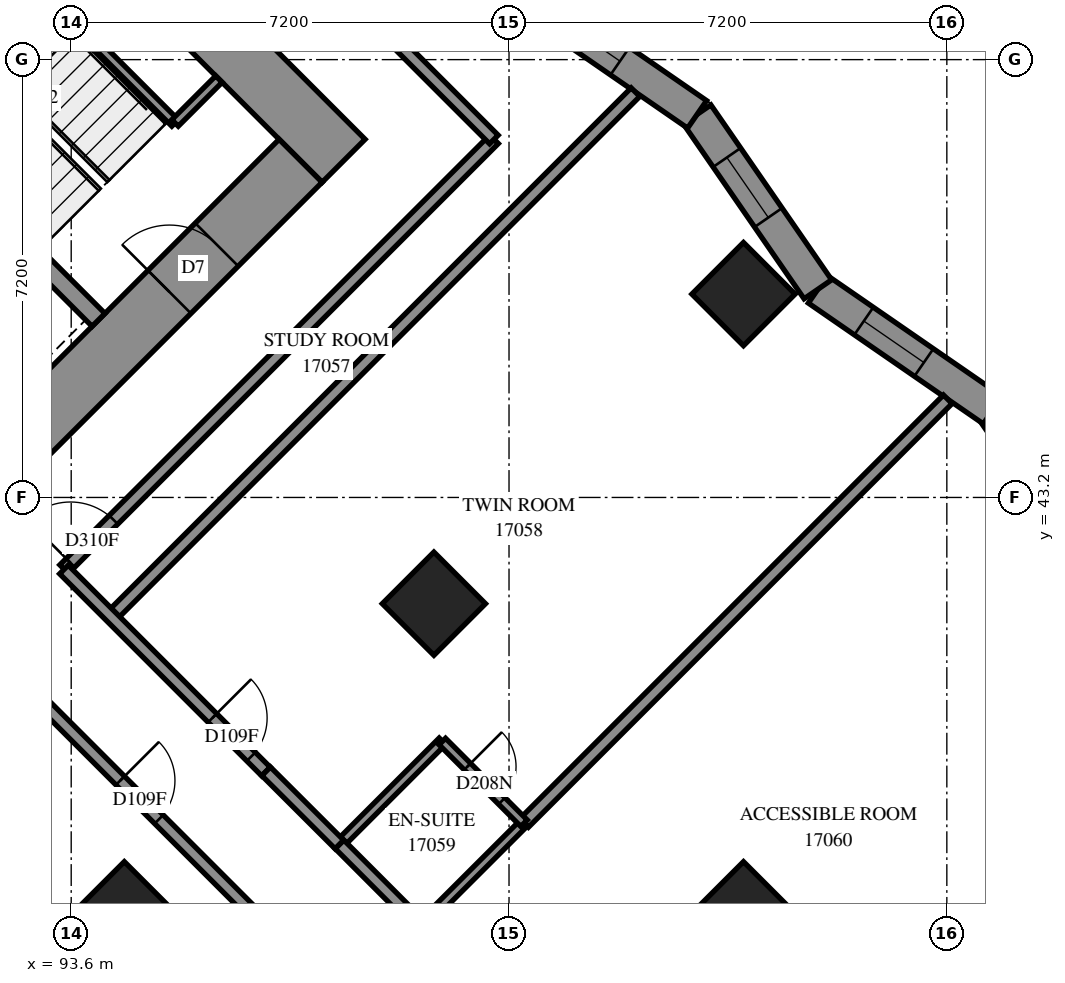
"""IFC4 building model, lengths in metres.
Left out: names, types, materials, properties, quantities, classifications, styles, units other than length and angle.
Written with IfcOpenShell. Run it as: python <this file> out.ifc"""

import sys

from ifc_helpers import new_model, si_unit, direction, frame, frame_2d, origin, origin_2d, place, context, subcontext, project, spatial, polyline, rectangle, outline, extrude, element, fill, save


model = new_model("IFC4")
c1 = context("Model", 3, precision=1e-05, world=origin(), true_north=direction((0.0, 1.0)))
c2 = subcontext(c1, "Body", "Model", "MODEL_VIEW")
j1 = project(units=[si_unit("LENGTHUNIT", "METRE"), si_unit("PLANEANGLEUNIT", "RADIAN")], contexts=[c1])
p1 = place(None, origin())
s1 = spatial("IfcSite", under=j1, at=p1, CompositionType="ELEMENT")
p2 = place(p1, origin())
s2 = spatial("IfcBuilding", under=s1, at=p2, CompositionType="ELEMENT")
p3 = place(p2, frame((0.0, 0.0, 64.4)))
s3 = spatial("IfcBuildingStorey", under=s2, at=p3, CompositionType="ELEMENT", Elevation=64.4)
for number, where, z_axis, x_axis in (
    (1, (104.656, 46.544, 0.0), (0.0, 0.0, 1.0), (0.707, -0.707, 0.0)),
    (2, (99.565, 41.453, 0.0), (0.0, 0.0, 1.0), (0.707, -0.707, 0.0)),
    (3, (94.474, 36.362, 0.0), (0.0, 0.0, 1.0), (0.707, -0.707, 0.0)),
    (4, (104.656, 36.362, 0.0), (0.0, 0.0, 1.0), (0.707, -0.707, 0.0)),
):
    element("IfcColumn", number, at=place(p3, frame(where, z_axis=z_axis, x_axis=x_axis)), inside=s3, PredefinedType="COLUMN", context=c2, shape_type="SweptSolid", body=[
        extrude(rectangle(XDim=1.2, YDim=1.2, at=origin_2d()), origin(), (0.0, 0.0, 1.0), 3.1),
    ])
p4 = place(p3, frame((86.483, 60.333, -0.3), z_axis=(0.0, 0.0, 1.0), x_axis=(0.70710983, -0.7071037324, 0.0)))
e5 = element("IfcWall", 5, at=p4, inside=s3, PredefinedType="SHEAR", context=c2, shape_type="SweptSolid", body=[
    extrude(rectangle(XDim=16.4, YDim=1.0, at=frame_2d((8.2, 0.0))), origin(), (0.0, 0.0, 1.0), 2.7),
])
p5 = place(p4, frame((11.0, 0.0, 0.3)))
e6 = element("IfcOpeningElement", 6, at=p5, cuts=e5, PredefinedType="OPENING", context=c2, shape_type="SweptSolid", body=[
    extrude(rectangle(XDim=0.8, YDim=2.1, at=frame_2d((0.4, 1.05))), frame((0.0, 0.51, 0.0), z_axis=(0.0, -1.0, 0.0), x_axis=(1.0, 0.0, 0.0)), (0.0, 0.0, 1.0), 1.02),
])
p6 = place(p3, frame((87.19, 38.554, -0.3), z_axis=(0.0, 0.0, 1.0), x_axis=(0.707103309, 0.7071102534, 0.0)))
e7 = element("IfcWall", 7, at=p6, inside=s3, PredefinedType="SHEAR", context=c2, shape_type="SweptSolid", body=[
    extrude(rectangle(XDim=14.4, YDim=1.0, at=frame_2d((7.2, 0.0))), origin(), (0.0, 0.0, 1.0), 2.7),
])
p7 = place(p6, frame((4.55, 0.0, 0.3)))
e8 = element("IfcOpeningElement", 8, at=p7, cuts=e7, PredefinedType="OPENING", context=c2, shape_type="SweptSolid", body=[
    extrude(rectangle(XDim=1.1, YDim=2.1, at=frame_2d((0.55, 1.05))), frame((0.0, 0.51, 0.0), z_axis=(0.0, -1.0, 0.0), x_axis=(1.0, 0.0, 0.0)), (0.0, 0.0, 1.0), 1.02),
])
p8 = place(p6, frame((11.35, 0.0, 0.3)))
e9 = element("IfcOpeningElement", 9, at=p8, cuts=e7, PredefinedType="OPENING", context=c2, shape_type="SweptSolid", body=[
    extrude(rectangle(XDim=1.1, YDim=2.1, at=frame_2d((0.55, 1.05))), frame((0.0, 0.51, 0.0), z_axis=(0.0, -1.0, 0.0), x_axis=(1.0, 0.0, 0.0)), (0.0, 0.0, 1.0), 1.02),
])
p9 = place(p3, frame((88.958, 51.211, 0.0), z_axis=(0.0, 0.0, 1.0), x_axis=(0.7070998367, -0.7071137256, 0.0)))
e10 = element("IfcWall", 10, at=p9, inside=s3, PredefinedType="SOLIDWALL", context=c2, shape_type="SweptSolid", body=[
    extrude(rectangle(XDim=7.2, YDim=0.3, at=frame_2d((3.6, 0.0))), origin(), (0.0, 0.0, 1.0), 3.1),
])
p10 = place(p3, frame((110.741, 41.761, 0.0), z_axis=(0.0, 0.0, 1.0), x_axis=(-0.5680698592, 0.822980337, 0.0)))
e11 = element("IfcWall", 11, at=p10, inside=s3, PredefinedType="SOLIDWALL", context=c2, shape_type="SweptSolid", body=[
    extrude(outline(polyline([(0.05, -0.275), (3.546, -0.275), (3.445, 0.275), (-0.05, 0.275), (0.05, -0.275)])), origin(), (0.0, 0.0, 1.0), 3.1),
])
p11 = place(p10, frame((1.269, 0.0, 0.5)))
e12 = element("IfcOpeningElement", 12, at=p11, cuts=e11, PredefinedType="OPENING", context=c2, shape_type="SweptSolid", body=[
    extrude(rectangle(XDim=1.2, YDim=2.45, at=frame_2d((0.6, 1.225))), frame((0.0, 0.285, 0.0), z_axis=(0.0, -1.0, 0.0), x_axis=(1.0, 0.0, 0.0)), (0.0, 0.0, 1.0), 0.57),
])
p12 = place(p3, frame((108.755, 44.637, 0.0), z_axis=(0.0, 0.0, 1.0), x_axis=(-0.8229761943, 0.5680758609, 0.0)))
e13 = element("IfcWall", 13, at=p12, inside=s3, PredefinedType="SOLIDWALL", context=c2, shape_type="SweptSolid", body=[
    extrude(outline(polyline([(-0.05, -0.275), (3.445, -0.275), (3.546, 0.275), (0.05, 0.275), (-0.05, -0.275)])), origin(), (0.0, 0.0, 1.0), 3.1),
])
p13 = place(p12, frame((1.377, 0.0, 0.5)))
e14 = element("IfcOpeningElement", 14, at=p13, cuts=e13, PredefinedType="OPENING", context=c2, shape_type="SweptSolid", body=[
    extrude(rectangle(XDim=1.2, YDim=2.45, at=frame_2d((0.6, 1.225))), frame((0.0, 0.285, 0.0), z_axis=(0.0, -1.0, 0.0), x_axis=(1.0, 0.0, 0.0)), (0.0, 0.0, 1.0), 0.57),
])
p14 = place(p3, frame((105.879, 46.623, 0.0), z_axis=(0.0, 0.0, 1.0), x_axis=(-0.5680698592, 0.822980337, 0.0)))
e15 = element("IfcWall", 15, at=p14, inside=s3, PredefinedType="SOLIDWALL", context=c2, shape_type="SweptSolid", body=[
    extrude(outline(polyline([(0.05, -0.275), (3.546, -0.275), (3.445, 0.275), (-0.05, 0.275), (0.05, -0.275)])), origin(), (0.0, 0.0, 1.0), 3.1),
])
p15 = place(p14, frame((1.434, 0.0, 0.5)))
e16 = element("IfcOpeningElement", 16, at=p15, cuts=e15, PredefinedType="OPENING", context=c2, shape_type="SweptSolid", body=[
    extrude(rectangle(XDim=1.2, YDim=2.45, at=frame_2d((0.6, 1.225))), frame((0.0, 0.285, 0.0), z_axis=(0.0, -1.0, 0.0), x_axis=(1.0, 0.0, 0.0)), (0.0, 0.0, 1.0), 0.57),
])
p16 = place(p3, frame((103.893, 49.499, 0.0), z_axis=(0.0, 0.0, 1.0), x_axis=(-0.8229761943, 0.5680758609, 0.0)))
e17 = element("IfcWall", 17, at=p16, inside=s3, PredefinedType="SOLIDWALL", context=c2, shape_type="SweptSolid", body=[
    extrude(outline(polyline([(-0.05, -0.275), (3.445, -0.275), (3.546, 0.275), (0.05, 0.275), (-0.05, -0.275)])), origin(), (0.0, 0.0, 1.0), 3.1),
])
p17 = place(p16, frame((1.541, 0.0, 0.5)))
e18 = element("IfcOpeningElement", 18, at=p17, cuts=e17, PredefinedType="OPENING", context=c2, shape_type="SweptSolid", body=[
    extrude(rectangle(XDim=1.2, YDim=2.45, at=frame_2d((0.6, 1.225))), frame((0.0, 0.285, 0.0), z_axis=(0.0, -1.0, 0.0), x_axis=(1.0, 0.0, 0.0)), (0.0, 0.0, 1.0), 0.57),
])
p18 = place(p3, frame((91.313, 53.354, 0.0), z_axis=(0.0, 0.0, 1.0), x_axis=(0.7071067812, -0.7071067812, 0.0)))
e19 = element("IfcWall", 19, at=p18, inside=s3, PredefinedType="PARTITIONING", context=c2, shape_type="SweptSolid", body=[
    extrude(rectangle(XDim=5.65, YDim=0.15, at=frame_2d((2.825, 0.0))), origin(), (0.0, 0.0, 1.0), 3.1),
])
p19 = place(p3, frame((95.308, 49.358, 0.0), z_axis=(0.0, 0.0, 1.0), x_axis=(0.70705776, 0.707155799, 0.0)))
e20 = element("IfcWall", 20, at=p19, inside=s3, PredefinedType="PARTITIONING", context=c2, shape_type="SweptSolid", body=[
    extrude(rectangle(XDim=1.02, YDim=0.15, at=frame_2d((0.51, 0.0))), origin(), (0.0, 0.0, 1.0), 3.1),
])
p20 = place(p3, frame((94.259, 41.243, 0.0), z_axis=(0.0, 0.0, 1.0), x_axis=(0.7070206559, 0.7071928959, 0.0)))
e21 = element("IfcWall", 21, at=p20, inside=s3, PredefinedType="PARTITIONING", context=c2, shape_type="SweptSolid", body=[
    extrude(rectangle(XDim=12.192, YDim=0.2, at=frame_2d((6.096, 0.0))), origin(), (0.0, 0.0, 1.0), 3.1),
])
p21 = place(p3, frame((93.484, 42.02, 0.0), z_axis=(0.0, 0.0, 1.0), x_axis=(0.7071067812, 0.7071067812, 0.0)))
e22 = element("IfcWall", 22, at=p21, inside=s3, PredefinedType="PARTITIONING", context=c2, shape_type="SweptSolid", body=[
    extrude(rectangle(XDim=9.998, YDim=0.2, at=frame_2d((4.999, 0.0))), origin(), (0.0, 0.0, 1.0), 3.1),
])
p22 = place(p21, frame((0.148, 0.0, 0.0)))
e23 = element("IfcOpeningElement", 23, at=p22, cuts=e22, PredefinedType="OPENING", context=c2, shape_type="SweptSolid", body=[
    extrude(rectangle(XDim=1.0, YDim=2.1, at=frame_2d((0.5, 1.05))), frame((0.0, 0.11, 0.0), z_axis=(0.0, -1.0, 0.0), x_axis=(1.0, 0.0, 0.0)), (0.0, 0.0, 1.0), 0.22),
])
p23 = place(p3, frame((106.14, 32.756, 0.0), z_axis=(0.0, 0.0, 1.0), x_axis=(0.7071017366, 0.7071118258, 0.0)))
e24 = element("IfcWall", 24, at=p23, inside=s3, PredefinedType="PARTITIONING", context=c2, shape_type="SweptSolid", body=[
    extrude(rectangle(XDim=9.912, YDim=0.2, at=frame_2d((4.956, 0.0))), origin(), (0.0, 0.0, 1.0), 3.1),
])
p24 = place(p3, frame((101.049, 37.847, 0.0), z_axis=(0.0, 0.0, 1.0), x_axis=(0.7071067812, 0.7071067812, 0.0)))
e25 = element("IfcWall", 25, at=p24, inside=s3, PredefinedType="PARTITIONING", context=c2, shape_type="SweptSolid", body=[
    extrude(rectangle(XDim=9.852, YDim=0.2, at=frame_2d((4.926, 0.0))), origin(), (0.0, 0.0, 1.0), 3.1),
])
p25 = place(p3, frame((92.349, 40.601, 0.0), z_axis=(0.0, 0.0, 1.0), x_axis=(0.7071067812, -0.7071067812, 0.0)))
e26 = element("IfcWall", 26, at=p25, inside=s3, PredefinedType="PARTITIONING", context=c2, shape_type="SweptSolid", body=[
    extrude(rectangle(XDim=8.101, YDim=0.2, at=frame_2d((4.05, 0.0))), origin(), (0.0, 0.0, 1.0), 3.1),
])
p26 = place(p25, frame((2.909, 0.0, 0.0)))
e27 = element("IfcOpeningElement", 27, at=p26, cuts=e26, PredefinedType="OPENING", context=c2, shape_type="SweptSolid", body=[
    extrude(rectangle(XDim=0.9, YDim=2.1, at=frame_2d((0.45, 1.05))), frame((0.0, 0.11, 0.0), z_axis=(0.0, -1.0, 0.0), x_axis=(1.0, 0.0, 0.0)), (0.0, 0.0, 1.0), 0.22),
])
p27 = place(p3, frame((93.481, 42.015, 0.0), z_axis=(0.0, 0.0, 1.0), x_axis=(0.7071067812, -0.7071067812, 0.0)))
e28 = element("IfcWall", 28, at=p27, inside=s3, PredefinedType="PARTITIONING", context=c2, shape_type="SweptSolid", body=[
    extrude(rectangle(XDim=4.698, YDim=0.2, at=frame_2d((2.349, 0.0))), origin(), (0.0, 0.0, 1.0), 3.1),
])
p28 = place(p27, frame((3.452, 0.0, 0.0)))
e29 = element("IfcOpeningElement", 29, at=p28, cuts=e28, PredefinedType="OPENING", context=c2, shape_type="SweptSolid", body=[
    extrude(rectangle(XDim=0.9, YDim=2.1, at=frame_2d((0.45, 1.05))), frame((0.0, 0.11, 0.0), z_axis=(0.0, -1.0, 0.0), x_axis=(1.0, 0.0, 0.0)), (0.0, 0.0, 1.0), 0.22),
])
p29 = place(p3, frame((98.783, 50.855, 0.0), z_axis=(0.0, 0.0, 1.0), x_axis=(0.7071067812, -0.7071067812, 0.0)))
e30 = element("IfcWall", 30, at=p29, inside=s3, PredefinedType="PARTITIONING", context=c2, shape_type="SweptSolid", body=[
    extrude(rectangle(XDim=2.5, YDim=0.2, at=frame_2d((1.25, 0.0))), origin(), (0.0, 0.0, 1.0), 3.1),
])
p30 = place(p3, frame((99.349, 36.153, 0.0), z_axis=(0.0, 0.0, 1.0), x_axis=(0.7075233388, 0.706689978, 0.0)))
e31 = element("IfcWall", 31, at=p30, inside=s3, PredefinedType="PARTITIONING", context=c2, shape_type="SweptSolid", body=[
    extrude(rectangle(XDim=2.4, YDim=0.15, at=frame_2d((1.2, 0.0))), origin(), (0.0, 0.0, 1.0), 3.1),
])
p31 = place(p3, frame((98.009, 37.495, 0.0), z_axis=(0.0, 0.0, 1.0), x_axis=(0.7071067812, 0.7071067812, 0.0)))
e32 = element("IfcWall", 32, at=p31, inside=s3, PredefinedType="PARTITIONING", context=c2, shape_type="SweptSolid", body=[
    extrude(rectangle(XDim=2.398, YDim=0.15, at=frame_2d((1.199, 0.0))), origin(), (0.0, 0.0, 1.0), 3.1),
])
p32 = place(p3, frame((99.703, 39.187, 0.0), z_axis=(0.0, 0.0, 1.0), x_axis=(0.7071067812, -0.7071067812, 0.0)))
e33 = element("IfcWall", 33, at=p32, inside=s3, PredefinedType="PARTITIONING", context=c2, shape_type="SweptSolid", body=[
    extrude(rectangle(XDim=1.901, YDim=0.15, at=frame_2d((0.95, 0.0))), origin(), (0.0, 0.0, 1.0), 3.1),
])
p33 = place(p32, frame((0.584, 0.0, 0.0)))
e34 = element("IfcOpeningElement", 34, at=p33, cuts=e33, PredefinedType="OPENING", context=c2, shape_type="SweptSolid", body=[
    extrude(rectangle(XDim=0.8, YDim=2.1, at=frame_2d((0.4, 1.05))), frame((0.0, 0.085, 0.0), z_axis=(0.0, -1.0, 0.0), x_axis=(1.0, 0.0, 0.0)), (0.0, 0.0, 1.0), 0.17),
])
p34 = place(p3, frame((98.012, 37.496, 0.0), z_axis=(0.0, 0.0, 1.0), x_axis=(0.7065800724, -0.7076330979, 0.0)))
e35 = element("IfcWall", 35, at=p34, inside=s3, PredefinedType="PARTITIONING", context=c2, shape_type="SweptSolid", body=[
    extrude(rectangle(XDim=1.899, YDim=0.2, at=frame_2d((0.95, 0.0))), origin(), (0.0, 0.0, 1.0), 3.1),
])
p35 = place(p3, frame((96.806, 38.696, 0.0), z_axis=(0.0, 0.0, 1.0), x_axis=(0.7076943229, -0.7065187509, 0.0)))
e36 = element("IfcWall", 36, at=p35, inside=s3, PredefinedType="PARTITIONING", context=c2, shape_type="SweptSolid", body=[
    extrude(rectangle(XDim=1.701, YDim=0.2, at=frame_2d((0.851, 0.0))), origin(), (0.0, 0.0, 1.0), 3.1),
])
p36 = place(p13, origin())
e37 = element("IfcWindow", 37, at=p36, inside=s3, PartitioningType="SINGLE_PANEL", PredefinedType="WINDOW", context=c2, shape_type="SweptSolid", body=[
    extrude(rectangle(XDim=1.2, YDim=2.45, at=frame_2d((0.6, 1.225))), frame((0.0, 0.155, 0.0), z_axis=(0.0, -1.0, 0.0), x_axis=(1.0, 0.0, 0.0)), (0.0, 0.0, 1.0), 0.06),
])
fill(e14, e37)
p37 = place(p15, origin())
e38 = element("IfcWindow", 38, at=p37, inside=s3, PartitioningType="SINGLE_PANEL", PredefinedType="WINDOW", context=c2, shape_type="SweptSolid", body=[
    extrude(rectangle(XDim=1.2, YDim=2.45, at=frame_2d((0.6, 1.225))), frame((0.0, 0.155, 0.0), z_axis=(0.0, -1.0, 0.0), x_axis=(1.0, 0.0, 0.0)), (0.0, 0.0, 1.0), 0.06),
])
fill(e16, e38)
p38 = place(p17, origin())
e39 = element("IfcWindow", 39, at=p38, inside=s3, PartitioningType="SINGLE_PANEL", PredefinedType="WINDOW", context=c2, shape_type="SweptSolid", body=[
    extrude(rectangle(XDim=1.2, YDim=2.45, at=frame_2d((0.6, 1.225))), frame((0.0, 0.155, 0.0), z_axis=(0.0, -1.0, 0.0), x_axis=(1.0, 0.0, 0.0)), (0.0, 0.0, 1.0), 0.06),
])
fill(e18, e39)
p39 = place(p8, origin())
e40 = element("IfcDoor", 40, at=p39, inside=s3, OperationType="SINGLE_SWING_RIGHT", PredefinedType="DOOR", context=c2, shape_type="SweptSolid", body=[
    extrude(rectangle(XDim=1.1, YDim=2.1, at=frame_2d((0.55, 1.05))), frame((0.0, 0.025, 0.0), z_axis=(0.0, -1.0, 0.0), x_axis=(1.0, 0.0, 0.0)), (0.0, 0.0, 1.0), 0.05),
])
fill(e9, e40)
p40 = place(p22, origin())
e41 = element("IfcDoor", 41, at=p40, inside=s3, OperationType="SINGLE_SWING_LEFT", PredefinedType="DOOR", context=c2, shape_type="SweptSolid", body=[
    extrude(rectangle(XDim=1.0, YDim=2.1, at=frame_2d((0.5, 1.05))), frame((0.0, 0.025, 0.0), z_axis=(0.0, -1.0, 0.0), x_axis=(1.0, 0.0, 0.0)), (0.0, 0.0, 1.0), 0.05),
])
fill(e23, e41)
p41 = place(p28, origin())
e42 = element("IfcDoor", 42, at=p41, inside=s3, OperationType="SINGLE_SWING_RIGHT", PredefinedType="DOOR", context=c2, shape_type="SweptSolid", body=[
    extrude(rectangle(XDim=0.9, YDim=2.1, at=frame_2d((0.45, 1.05))), frame((0.0, 0.025, 0.0), z_axis=(0.0, -1.0, 0.0), x_axis=(1.0, 0.0, 0.0)), (0.0, 0.0, 1.0), 0.05),
])
fill(e29, e42)
p42 = place(p33, origin())
e43 = element("IfcDoor", 43, at=p42, inside=s3, OperationType="SINGLE_SWING_RIGHT", PredefinedType="DOOR", context=c2, shape_type="SweptSolid", body=[
    extrude(rectangle(XDim=0.8, YDim=2.1, at=frame_2d((0.4, 1.05))), frame((0.0, 0.025, 0.0), z_axis=(0.0, -1.0, 0.0), x_axis=(1.0, 0.0, 0.0)), (0.0, 0.0, 1.0), 0.05),
])
fill(e34, e43)
p43 = place(p26, origin())
e44 = element("IfcDoor", 44, at=p43, inside=s3, OperationType="SINGLE_SWING_LEFT", PredefinedType="DOOR", context=c2, shape_type="SweptSolid", body=[
    extrude(rectangle(XDim=0.9, YDim=2.1, at=frame_2d((0.45, 1.05))), frame((0.0, 0.025, 0.0), z_axis=(0.0, -1.0, 0.0), x_axis=(1.0, 0.0, 0.0)), (0.0, 0.0, 1.0), 0.05),
])
fill(e27, e44)
save(model, sys.argv[1])
